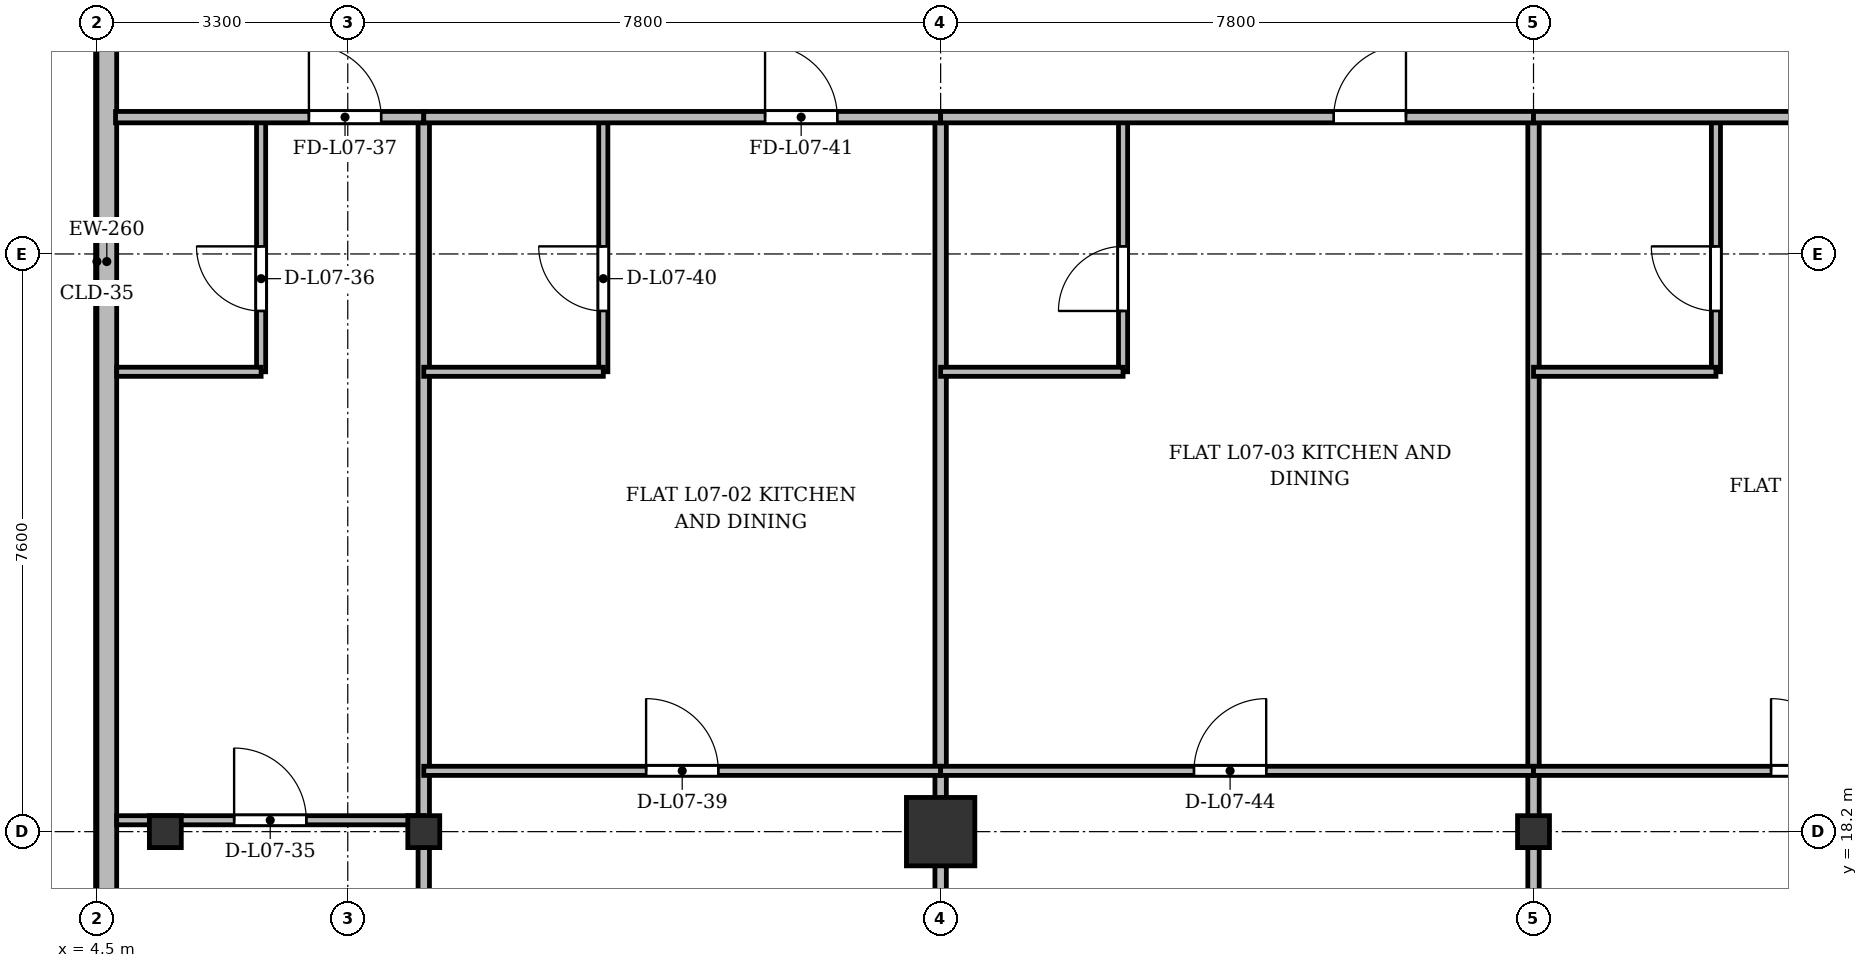
"""IFC4 building model, lengths in metres.
Left out: names, types, materials, properties, quantities, classifications, styles, units other than length and angle.
Written with IfcOpenShell. Run it as: python <this file> out.ifc"""

import sys

from ifc_helpers import new_model, si_unit, direction, frame, frame_2d, origin, origin_2d, place, context, subcontext, project, spatial, rectangle, i_section, extrude, source, transform, mapped, element, fill, save


model = new_model("IFC4")
c1 = context("Model", 3, precision=1e-05, world=origin(), true_north=direction((0.0, 1.0)))
c2 = subcontext(c1, "Body", "Model", "MODEL_VIEW")
j1 = project(units=[si_unit("LENGTHUNIT", "METRE"), si_unit("PLANEANGLEUNIT", "RADIAN")], contexts=[c1])
p1 = place(None, origin())
s1 = spatial("IfcSite", under=j1, at=p1, CompositionType="ELEMENT")
p2 = place(p1, origin())
s2 = spatial("IfcBuilding", under=s1, at=p2, CompositionType="ELEMENT")
p3 = place(p2, frame((0.0, 0.0, 30.7)))
s3 = spatial("IfcBuildingStorey", under=s2, at=p3, CompositionType="ELEMENT", Elevation=30.7)
m1 = source(origin(), c2, "Body", "SweptSolid", [
    extrude(i_section(OverallWidth=0.42, OverallDepth=0.42, WebThickness=0.026, FlangeThickness=0.04, at=origin_2d()), origin(), (0.0, 0.0, 1.0), 3.6),
])
for number, where, z_axis, x_axis in (
    (1, (5.4, 18.2, 0.0), (0.0, 0.0, 1.0), (1.0, 0.0, 0.0)),
    (2, (8.8, 18.2, 0.0), (0.0, 0.0, 1.0), (1.0, 0.0, 0.0)),
):
    element("IfcColumn", number, at=place(p3, frame(where, z_axis=z_axis, x_axis=x_axis)), inside=s3, PredefinedType="COLUMN", context=c2, shape_type="MappedRepresentation", body=[
        mapped(m1, transform((0.0, 0.0, 0.0), x_axis=(1.0, 0.0, 0.0), y_axis=(0.0, 1.0, 0.0), z_axis=(0.0, 0.0, 1.0), scale=1.0)),
    ])
m2 = source(origin(), c2, "Body", "SweptSolid", [
    extrude(rectangle(XDim=0.9, YDim=0.9, at=origin_2d()), origin(), (0.0, 0.0, 1.0), 3.6),
])
p4 = place(p3, frame((15.6, 18.2, 0.0), z_axis=(0.0, 0.0, 1.0), x_axis=(1.0, 0.0, 0.0)))
e3 = element("IfcColumn", 3, at=p4, inside=s3, PredefinedType="COLUMN", context=c2, shape_type="MappedRepresentation", body=[
    mapped(m2, transform((0.0, 0.0, 0.0), x_axis=(1.0, 0.0, 0.0), y_axis=(0.0, 1.0, 0.0), z_axis=(0.0, 0.0, 1.0), scale=1.0)),
])
p5 = place(p3, frame((23.4, 18.2, 0.0), z_axis=(0.0, 0.0, 1.0), x_axis=(1.0, 0.0, 0.0)))
e4 = element("IfcColumn", 4, at=p5, inside=s3, PredefinedType="COLUMN", context=c2, shape_type="MappedRepresentation", body=[
    mapped(m1, transform((0.0, 0.0, 0.0), x_axis=(1.0, 0.0, 0.0), y_axis=(0.0, 1.0, 0.0), z_axis=(0.0, 0.0, 1.0), scale=1.0)),
])
p6 = place(p3, frame((4.63, 5.9, 0.0), z_axis=(0.0, 0.0, 1.0), x_axis=(0.0, 1.0, 0.0)))
e5 = element("IfcWall", 5, at=p6, inside=s3, PredefinedType="SOLIDWALL", context=c2, shape_type="SweptSolid", body=[
    extrude(rectangle(XDim=39.6, YDim=0.26, at=frame_2d((19.8, 0.0))), origin(), (0.0, 0.0, 1.0), 3.34),
])
p7 = place(p6, frame((1.45, 0.0, 0.92)))
e6 = element("IfcOpeningElement", 6, at=p7, cuts=e5, PredefinedType="OPENING", context=c2, shape_type="SweptSolid", body=[
    extrude(rectangle(XDim=1.2, YDim=1.65, at=frame_2d((0.6, 0.825))), frame((0.0, 0.14, 0.0), z_axis=(0.0, -1.0, 0.0), x_axis=(1.0, 0.0, 0.0)), (0.0, 0.0, 1.0), 0.28),
])
p8 = place(p6, frame((4.3, 0.0, 0.92)))
e7 = element("IfcOpeningElement", 7, at=p8, cuts=e5, PredefinedType="OPENING", context=c2, shape_type="SweptSolid", body=[
    extrude(rectangle(XDim=2.4, YDim=2.1, at=frame_2d((1.2, 1.05))), frame((0.0, 0.14, 0.0), z_axis=(0.0, -1.0, 0.0), x_axis=(1.0, 0.0, 0.0)), (0.0, 0.0, 1.0), 0.28),
])
p9 = place(p6, frame((8.5, 0.0, 0.92)))
e8 = element("IfcOpeningElement", 8, at=p9, cuts=e5, PredefinedType="OPENING", context=c2, shape_type="SweptSolid", body=[
    extrude(rectangle(XDim=2.4, YDim=2.1, at=frame_2d((1.2, 1.05))), frame((0.0, 0.14, 0.0), z_axis=(0.0, -1.0, 0.0), x_axis=(1.0, 0.0, 0.0)), (0.0, 0.0, 1.0), 0.28),
])
p10 = place(p6, frame((33.9, 0.0, 0.92)))
e9 = element("IfcOpeningElement", 9, at=p10, cuts=e5, PredefinedType="OPENING", context=c2, shape_type="SweptSolid", body=[
    extrude(rectangle(XDim=1.2, YDim=1.65, at=frame_2d((0.6, 0.825))), frame((0.0, 0.14, 0.0), z_axis=(0.0, -1.0, 0.0), x_axis=(1.0, 0.0, 0.0)), (0.0, 0.0, 1.0), 0.28),
])
p11 = place(p6, frame((37.25, 0.0, 0.92)))
e10 = element("IfcOpeningElement", 10, at=p11, cuts=e5, PredefinedType="OPENING", context=c2, shape_type="SweptSolid", body=[
    extrude(rectangle(XDim=1.2, YDim=1.65, at=frame_2d((0.6, 0.825))), frame((0.0, 0.14, 0.0), z_axis=(0.0, -1.0, 0.0), x_axis=(1.0, 0.0, 0.0)), (0.0, 0.0, 1.0), 0.28),
])
for number, where, z_axis, x_axis in (
    (11, (8.8, 3.145, 0.0), (0.0, 0.0, 1.0), (0.0, 1.0, 0.0)),
    (12, (15.6, 3.145, 0.0), (0.0, 0.0, 1.0), (0.0, 1.0, 0.0)),
    (13, (23.4, 3.145, 0.0), (0.0, 0.0, 1.0), (0.0, 1.0, 0.0)),
):
    element("IfcWall", number, at=place(p3, frame(where, z_axis=z_axis, x_axis=x_axis)), inside=s3, PredefinedType="PARTITIONING", context=c2, shape_type="SweptSolid", body=[
        extrude(rectangle(XDim=24.455, YDim=0.15, at=frame_2d((12.228, 0.0))), origin(), (0.0, 0.0, 1.0), 2.752),
    ])
p12 = place(p3, frame((4.76, 18.35, 0.0), z_axis=(0.0, 0.0, 1.0), x_axis=(1.0, 0.0, 0.0)))
e14 = element("IfcWall", 14, at=p12, inside=s3, PredefinedType="PARTITIONING", context=c2, shape_type="SweptSolid", body=[
    extrude(rectangle(XDim=4.04, YDim=0.12, at=frame_2d((2.02, 0.0))), origin(), (0.0, 0.0, 1.0), 2.69),
])
p13 = place(p12, frame((1.545, 0.0, 0.0)))
e15 = element("IfcOpeningElement", 15, at=p13, cuts=e14, PredefinedType="OPENING", context=c2, shape_type="SweptSolid", body=[
    extrude(rectangle(XDim=0.95, YDim=2.15, at=frame_2d((0.475, 1.075))), frame((0.0, 0.07, 0.0), z_axis=(0.0, -1.0, 0.0), x_axis=(1.0, 0.0, 0.0)), (0.0, 0.0, 1.0), 0.14),
])
p14 = place(p3, frame((6.66, 24.25, 0.0), z_axis=(0.0, 0.0, 1.0), x_axis=(0.0, 1.0, 0.0)))
e16 = element("IfcWall", 16, at=p14, inside=s3, PredefinedType="PARTITIONING", context=c2, shape_type="SweptSolid", body=[
    extrude(rectangle(XDim=3.35, YDim=0.12, at=frame_2d((1.675, 0.0))), origin(), (0.0, 0.0, 1.0), 2.94),
])
p15 = place(p14, frame((0.8, 0.0, 0.0)))
e17 = element("IfcOpeningElement", 17, at=p15, cuts=e16, PredefinedType="OPENING", context=c2, shape_type="SweptSolid", body=[
    extrude(rectangle(XDim=0.85, YDim=2.1, at=frame_2d((0.425, 1.05))), frame((0.0, 0.07, 0.0), z_axis=(0.0, -1.0, 0.0), x_axis=(1.0, 0.0, 0.0)), (0.0, 0.0, 1.0), 0.14),
])
p16 = place(p3, frame((4.76, 24.25, 0.0), z_axis=(0.0, 0.0, 1.0), x_axis=(1.0, 0.0, 0.0)))
e18 = element("IfcWall", 18, at=p16, inside=s3, PredefinedType="PARTITIONING", context=c2, shape_type="SweptSolid", body=[
    extrude(rectangle(XDim=1.9, YDim=0.12, at=frame_2d((0.95, 0.0))), origin(), (0.0, 0.0, 1.0), 2.752),
])
p17 = place(p3, frame((4.745, 27.6, 0.0), z_axis=(0.0, 0.0, 1.0), x_axis=(1.0, 0.0, 0.0)))
e19 = element("IfcWall", 19, at=p17, inside=s3, PredefinedType="PARTITIONING", context=c2, shape_type="SweptSolid", body=[
    extrude(rectangle(XDim=4.055, YDim=0.15, at=frame_2d((2.027, 0.0))), origin(), (0.0, 0.0, 1.0), 2.752),
])
p18 = place(p17, frame((2.544, 0.0, 0.0)))
e20 = element("IfcOpeningElement", 20, at=p18, cuts=e19, PredefinedType="OPENING", context=c2, shape_type="SweptSolid", body=[
    extrude(rectangle(XDim=0.95, YDim=2.15, at=frame_2d((0.475, 1.075))), frame((0.0, 0.085, 0.0), z_axis=(0.0, -1.0, 0.0), x_axis=(1.0, 0.0, 0.0)), (0.0, 0.0, 1.0), 0.17),
])
p19 = place(p3, frame((8.8, 19.0, 0.0), z_axis=(0.0, 0.0, 1.0), x_axis=(1.0, 0.0, 0.0)))
e21 = element("IfcWall", 21, at=p19, inside=s3, PredefinedType="PARTITIONING", context=c2, shape_type="SweptSolid", body=[
    extrude(rectangle(XDim=6.8, YDim=0.12, at=frame_2d((3.4, 0.0))), origin(), (0.0, 0.0, 1.0), 2.752),
])
p20 = place(p19, frame((2.925, 0.0, 0.0)))
e22 = element("IfcOpeningElement", 22, at=p20, cuts=e21, PredefinedType="OPENING", context=c2, shape_type="SweptSolid", body=[
    extrude(rectangle(XDim=0.95, YDim=2.15, at=frame_2d((0.475, 1.075))), frame((0.0, 0.07, 0.0), z_axis=(0.0, -1.0, 0.0), x_axis=(1.0, 0.0, 0.0)), (0.0, 0.0, 1.0), 0.14),
])
p21 = place(p3, frame((11.162, 24.25, 0.0), z_axis=(0.0, 0.0, 1.0), x_axis=(0.0, 1.0, 0.0)))
e23 = element("IfcWall", 23, at=p21, inside=s3, PredefinedType="PARTITIONING", context=c2, shape_type="SweptSolid", body=[
    extrude(rectangle(XDim=3.35, YDim=0.12, at=frame_2d((1.675, 0.0))), origin(), (0.0, 0.0, 1.0), 2.94),
])
p22 = place(p21, frame((0.8, 0.0, 0.0)))
e24 = element("IfcOpeningElement", 24, at=p22, cuts=e23, PredefinedType="OPENING", context=c2, shape_type="SweptSolid", body=[
    extrude(rectangle(XDim=0.85, YDim=2.1, at=frame_2d((0.425, 1.05))), frame((0.0, 0.07, 0.0), z_axis=(0.0, -1.0, 0.0), x_axis=(1.0, 0.0, 0.0)), (0.0, 0.0, 1.0), 0.14),
])
p23 = place(p3, frame((8.8, 24.25, 0.0), z_axis=(0.0, 0.0, 1.0), x_axis=(1.0, 0.0, 0.0)))
e25 = element("IfcWall", 25, at=p23, inside=s3, PredefinedType="PARTITIONING", context=c2, shape_type="SweptSolid", body=[
    extrude(rectangle(XDim=2.362, YDim=0.12, at=frame_2d((1.181, 0.0))), origin(), (0.0, 0.0, 1.0), 2.752),
])
p24 = place(p3, frame((8.8, 27.6, 0.0), z_axis=(0.0, 0.0, 1.0), x_axis=(1.0, 0.0, 0.0)))
e26 = element("IfcWall", 26, at=p24, inside=s3, PredefinedType="PARTITIONING", context=c2, shape_type="SweptSolid", body=[
    extrude(rectangle(XDim=6.8, YDim=0.15, at=frame_2d((3.4, 0.0))), origin(), (0.0, 0.0, 1.0), 2.752),
])
p25 = place(p24, frame((4.49, 0.0, 0.0)))
e27 = element("IfcOpeningElement", 27, at=p25, cuts=e26, PredefinedType="OPENING", context=c2, shape_type="SweptSolid", body=[
    extrude(rectangle(XDim=0.95, YDim=2.15, at=frame_2d((0.475, 1.075))), frame((0.0, 0.085, 0.0), z_axis=(0.0, -1.0, 0.0), x_axis=(1.0, 0.0, 0.0)), (0.0, 0.0, 1.0), 0.17),
])
p26 = place(p3, frame((15.6, 19.0, 0.0), z_axis=(0.0, 0.0, 1.0), x_axis=(1.0, 0.0, 0.0)))
e28 = element("IfcWall", 28, at=p26, inside=s3, PredefinedType="PARTITIONING", context=c2, shape_type="SweptSolid", body=[
    extrude(rectangle(XDim=7.8, YDim=0.12, at=frame_2d((3.9, 0.0))), origin(), (0.0, 0.0, 1.0), 2.752),
])
p27 = place(p26, frame((3.333, 0.0, 0.0)))
e29 = element("IfcOpeningElement", 29, at=p27, cuts=e28, PredefinedType="OPENING", context=c2, shape_type="SweptSolid", body=[
    extrude(rectangle(XDim=0.95, YDim=2.15, at=frame_2d((0.475, 1.075))), frame((0.0, 0.07, 0.0), z_axis=(0.0, -1.0, 0.0), x_axis=(1.0, 0.0, 0.0)), (0.0, 0.0, 1.0), 0.14),
])
p28 = place(p3, frame((18.0, 24.25, 0.0), z_axis=(0.0, 0.0, 1.0), x_axis=(0.0, 1.0, 0.0)))
e30 = element("IfcWall", 30, at=p28, inside=s3, PredefinedType="PARTITIONING", context=c2, shape_type="SweptSolid", body=[
    extrude(rectangle(XDim=3.35, YDim=0.12, at=frame_2d((1.675, 0.0))), origin(), (0.0, 0.0, 1.0), 2.94),
])
p29 = place(p28, frame((0.8, 0.0, 0.0)))
e31 = element("IfcOpeningElement", 31, at=p29, cuts=e30, PredefinedType="OPENING", context=c2, shape_type="SweptSolid", body=[
    extrude(rectangle(XDim=0.85, YDim=2.1, at=frame_2d((0.425, 1.05))), frame((0.0, 0.07, 0.0), z_axis=(0.0, -1.0, 0.0), x_axis=(1.0, 0.0, 0.0)), (0.0, 0.0, 1.0), 0.14),
])
p30 = place(p3, frame((15.6, 24.25, 0.0), z_axis=(0.0, 0.0, 1.0), x_axis=(1.0, 0.0, 0.0)))
e32 = element("IfcWall", 32, at=p30, inside=s3, PredefinedType="PARTITIONING", context=c2, shape_type="SweptSolid", body=[
    extrude(rectangle(XDim=2.4, YDim=0.12, at=frame_2d((1.2, 0.0))), origin(), (0.0, 0.0, 1.0), 2.752),
])
p31 = place(p3, frame((15.6, 27.6, 0.0), z_axis=(0.0, 0.0, 1.0), x_axis=(1.0, 0.0, 0.0)))
e33 = element("IfcWall", 33, at=p31, inside=s3, PredefinedType="PARTITIONING", context=c2, shape_type="SweptSolid", body=[
    extrude(rectangle(XDim=7.8, YDim=0.15, at=frame_2d((3.9, 0.0))), origin(), (0.0, 0.0, 1.0), 2.752),
])
p32 = place(p31, frame((5.172, 0.0, 0.0)))
e34 = element("IfcOpeningElement", 34, at=p32, cuts=e33, PredefinedType="OPENING", context=c2, shape_type="SweptSolid", body=[
    extrude(rectangle(XDim=0.95, YDim=2.15, at=frame_2d((0.475, 1.075))), frame((0.0, 0.085, 0.0), z_axis=(0.0, -1.0, 0.0), x_axis=(1.0, 0.0, 0.0)), (0.0, 0.0, 1.0), 0.17),
])
p33 = place(p3, frame((23.4, 19.0, 0.0), z_axis=(0.0, 0.0, 1.0), x_axis=(1.0, 0.0, 0.0)))
e35 = element("IfcWall", 35, at=p33, inside=s3, PredefinedType="PARTITIONING", context=c2, shape_type="SweptSolid", body=[
    extrude(rectangle(XDim=7.2, YDim=0.12, at=frame_2d((3.6, 0.0))), origin(), (0.0, 0.0, 1.0), 2.752),
])
p34 = place(p33, frame((3.125, 0.0, 0.0)))
e36 = element("IfcOpeningElement", 36, at=p34, cuts=e35, PredefinedType="OPENING", context=c2, shape_type="SweptSolid", body=[
    extrude(rectangle(XDim=0.95, YDim=2.15, at=frame_2d((0.475, 1.075))), frame((0.0, 0.07, 0.0), z_axis=(0.0, -1.0, 0.0), x_axis=(1.0, 0.0, 0.0)), (0.0, 0.0, 1.0), 0.14),
])
p35 = place(p3, frame((25.8, 24.25, 0.0), z_axis=(0.0, 0.0, 1.0), x_axis=(0.0, 1.0, 0.0)))
e37 = element("IfcWall", 37, at=p35, inside=s3, PredefinedType="PARTITIONING", context=c2, shape_type="SweptSolid", body=[
    extrude(rectangle(XDim=3.35, YDim=0.12, at=frame_2d((1.675, 0.0))), origin(), (0.0, 0.0, 1.0), 2.94),
])
p36 = place(p35, frame((0.8, 0.0, 0.0)))
e38 = element("IfcOpeningElement", 38, at=p36, cuts=e37, PredefinedType="OPENING", context=c2, shape_type="SweptSolid", body=[
    extrude(rectangle(XDim=0.85, YDim=2.1, at=frame_2d((0.425, 1.05))), frame((0.0, 0.07, 0.0), z_axis=(0.0, -1.0, 0.0), x_axis=(1.0, 0.0, 0.0)), (0.0, 0.0, 1.0), 0.14),
])
p37 = place(p3, frame((23.4, 24.25, 0.0), z_axis=(0.0, 0.0, 1.0), x_axis=(1.0, 0.0, 0.0)))
e39 = element("IfcWall", 39, at=p37, inside=s3, PredefinedType="PARTITIONING", context=c2, shape_type="SweptSolid", body=[
    extrude(rectangle(XDim=2.4, YDim=0.12, at=frame_2d((1.2, 0.0))), origin(), (0.0, 0.0, 1.0), 2.752),
])
p38 = place(p3, frame((23.4, 27.6, 0.0), z_axis=(0.0, 0.0, 1.0), x_axis=(1.0, 0.0, 0.0)))
e40 = element("IfcWall", 40, at=p38, inside=s3, PredefinedType="PARTITIONING", context=c2, shape_type="SweptSolid", body=[
    extrude(rectangle(XDim=7.2, YDim=0.15, at=frame_2d((3.6, 0.0))), origin(), (0.0, 0.0, 1.0), 2.752),
])
p39 = place(p38, frame((4.706, 0.0, 0.0)))
e41 = element("IfcOpeningElement", 41, at=p39, cuts=e40, PredefinedType="OPENING", context=c2, shape_type="SweptSolid", body=[
    extrude(rectangle(XDim=0.95, YDim=2.15, at=frame_2d((0.475, 1.075))), frame((0.0, 0.085, 0.0), z_axis=(0.0, -1.0, 0.0), x_axis=(1.0, 0.0, 0.0)), (0.0, 0.0, 1.0), 0.17),
])
m3 = source(origin(), c2, "Body", "SweptSolid", [
    extrude(rectangle(XDim=0.95, YDim=2.15, at=frame_2d((0.475, 1.075))), frame((0.0, 0.025, 0.0), z_axis=(0.0, -1.0, 0.0), x_axis=(1.0, 0.0, 0.0)), (0.0, 0.0, 1.0), 0.05),
])
p40 = place(p13, origin())
e42 = element("IfcDoor", 42, at=p40, inside=s3, OperationType="SINGLE_SWING_LEFT", PredefinedType="DOOR", context=c2, shape_type="MappedRepresentation", body=[
    mapped(m3, transform((0.0, 0.0, 0.0), x_axis=(1.0, 0.0, 0.0), y_axis=(0.0, 1.0, 0.0), z_axis=(0.0, 0.0, 1.0), scale=1.0)),
])
fill(e15, e42)
m4 = source(origin(), c2, "Body", "SweptSolid", [
    extrude(rectangle(XDim=0.85, YDim=2.1, at=frame_2d((0.425, 1.05))), frame((0.0, 0.025, 0.0), z_axis=(0.0, -1.0, 0.0), x_axis=(1.0, 0.0, 0.0)), (0.0, 0.0, 1.0), 0.05),
])
p41 = place(p15, origin())
e43 = element("IfcDoor", 43, at=p41, inside=s3, OperationType="SINGLE_SWING_RIGHT", PredefinedType="DOOR", context=c2, shape_type="MappedRepresentation", body=[
    mapped(m4, transform((0.0, 0.0, 0.0), x_axis=(1.0, 0.0, 0.0), y_axis=(0.0, 1.0, 0.0), z_axis=(0.0, 0.0, 1.0), scale=1.0)),
])
fill(e17, e43)
p42 = place(p18, origin())
e44 = element("IfcDoor", 44, at=p42, inside=s3, OperationType="SINGLE_SWING_LEFT", PredefinedType="DOOR", context=c2, shape_type="MappedRepresentation", body=[
    mapped(m3, transform((0.0, 0.0, 0.0), x_axis=(1.0, 0.0, 0.0), y_axis=(0.0, 1.0, 0.0), z_axis=(0.0, 0.0, 1.0), scale=1.0)),
])
fill(e20, e44)
p43 = place(p20, origin())
e45 = element("IfcDoor", 45, at=p43, inside=s3, OperationType="SINGLE_SWING_LEFT", PredefinedType="DOOR", context=c2, shape_type="MappedRepresentation", body=[
    mapped(m3, transform((0.0, 0.0, 0.0), x_axis=(1.0, 0.0, 0.0), y_axis=(0.0, 1.0, 0.0), z_axis=(0.0, 0.0, 1.0), scale=1.0)),
])
fill(e22, e45)
p44 = place(p22, origin())
e46 = element("IfcDoor", 46, at=p44, inside=s3, OperationType="SINGLE_SWING_RIGHT", PredefinedType="DOOR", context=c2, shape_type="MappedRepresentation", body=[
    mapped(m4, transform((0.0, 0.0, 0.0), x_axis=(1.0, 0.0, 0.0), y_axis=(0.0, 1.0, 0.0), z_axis=(0.0, 0.0, 1.0), scale=1.0)),
])
fill(e24, e46)
p45 = place(p25, origin())
e47 = element("IfcDoor", 47, at=p45, inside=s3, OperationType="SINGLE_SWING_LEFT", PredefinedType="DOOR", context=c2, shape_type="MappedRepresentation", body=[
    mapped(m3, transform((0.0, 0.0, 0.0), x_axis=(1.0, 0.0, 0.0), y_axis=(0.0, 1.0, 0.0), z_axis=(0.0, 0.0, 1.0), scale=1.0)),
])
fill(e27, e47)
p46 = place(p27, origin())
e48 = element("IfcDoor", 48, at=p46, inside=s3, OperationType="SINGLE_SWING_RIGHT", PredefinedType="DOOR", context=c2, shape_type="MappedRepresentation", body=[
    mapped(m3, transform((0.0, 0.0, 0.0), x_axis=(1.0, 0.0, 0.0), y_axis=(0.0, 1.0, 0.0), z_axis=(0.0, 0.0, 1.0), scale=1.0)),
])
fill(e29, e48)
p47 = place(p29, origin())
e49 = element("IfcDoor", 49, at=p47, inside=s3, OperationType="SINGLE_SWING_LEFT", PredefinedType="DOOR", context=c2, shape_type="MappedRepresentation", body=[
    mapped(m4, transform((0.0, 0.0, 0.0), x_axis=(1.0, 0.0, 0.0), y_axis=(0.0, 1.0, 0.0), z_axis=(0.0, 0.0, 1.0), scale=1.0)),
])
fill(e31, e49)
p48 = place(p32, origin())
e50 = element("IfcDoor", 50, at=p48, inside=s3, OperationType="SINGLE_SWING_RIGHT", PredefinedType="DOOR", context=c2, shape_type="MappedRepresentation", body=[
    mapped(m3, transform((0.0, 0.0, 0.0), x_axis=(1.0, 0.0, 0.0), y_axis=(0.0, 1.0, 0.0), z_axis=(0.0, 0.0, 1.0), scale=1.0)),
])
fill(e34, e50)
p49 = place(p34, origin())
e51 = element("IfcDoor", 51, at=p49, inside=s3, OperationType="SINGLE_SWING_LEFT", PredefinedType="DOOR", context=c2, shape_type="MappedRepresentation", body=[
    mapped(m3, transform((0.0, 0.0, 0.0), x_axis=(1.0, 0.0, 0.0), y_axis=(0.0, 1.0, 0.0), z_axis=(0.0, 0.0, 1.0), scale=1.0)),
])
fill(e36, e51)
p50 = place(p36, origin())
e52 = element("IfcDoor", 52, at=p50, inside=s3, OperationType="SINGLE_SWING_RIGHT", PredefinedType="DOOR", context=c2, shape_type="MappedRepresentation", body=[
    mapped(m4, transform((0.0, 0.0, 0.0), x_axis=(1.0, 0.0, 0.0), y_axis=(0.0, 1.0, 0.0), z_axis=(0.0, 0.0, 1.0), scale=1.0)),
])
fill(e38, e52)
save(model, sys.argv[1])
